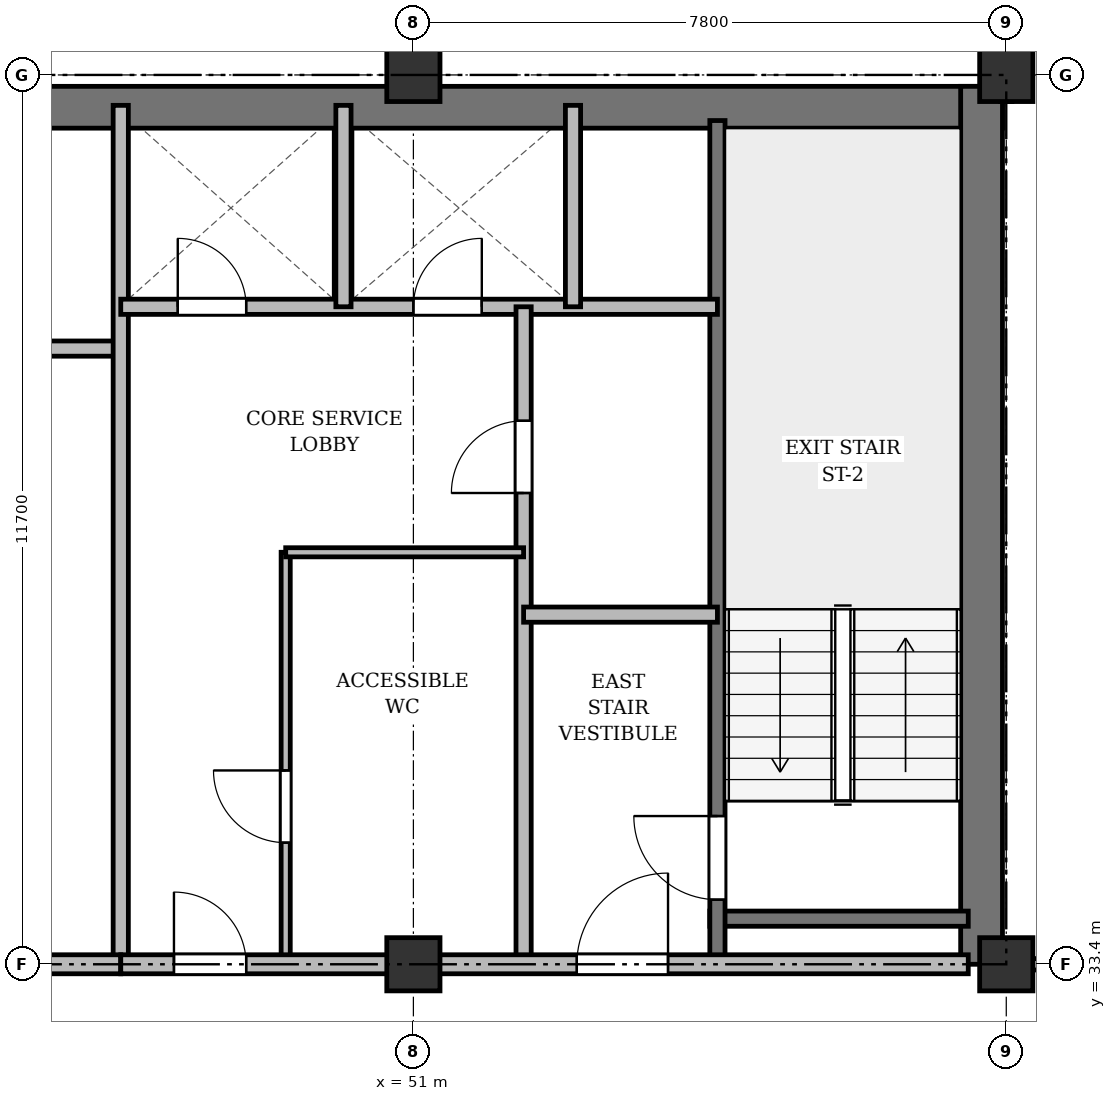
"""IFC4 building model, lengths in metres.
Left out: names, types, materials, properties, quantities, classifications, styles, units other than length and angle.
Written with IfcOpenShell. Run it as: python <this file> out.ifc"""

import sys

from ifc_helpers import new_model, si_unit, direction, frame, frame_2d, origin, origin_2d, place, context, subcontext, project, spatial, rectangle, extrude, source, transform, mapped, element, fill, save


model = new_model("IFC4")
c1 = context("Model", 3, precision=1e-05, world=origin(), true_north=direction((0.0, 1.0)))
c2 = subcontext(c1, "Body", "Model", "MODEL_VIEW")
j1 = project(units=[si_unit("LENGTHUNIT", "METRE"), si_unit("PLANEANGLEUNIT", "RADIAN")], contexts=[c1])
p1 = place(None, origin())
s1 = spatial("IfcSite", under=j1, at=p1, CompositionType="ELEMENT")
p2 = place(p1, origin())
s2 = spatial("IfcBuilding", under=s1, at=p2, CompositionType="ELEMENT")
p3 = place(p2, frame((0.0, 0.0, 178.9)))
s3 = spatial("IfcBuildingStorey", under=s2, at=p3, CompositionType="ELEMENT", Elevation=178.9)
m1 = source(origin(), c2, "Body", "SweptSolid", [
    extrude(rectangle(XDim=0.7, YDim=0.7, at=origin_2d()), origin(), (0.0, 0.0, 1.0), 3.6),
])
for number, where, z_axis, x_axis in (
    (1, (51.0, 33.4, 0.0), (0.0, 0.0, 1.0), (1.0, 0.0, 0.0)),
    (2, (51.0, 45.1, 0.0), (0.0, 0.0, 1.0), (1.0, 0.0, 0.0)),
    (3, (58.8, 33.4, 0.0), (0.0, 0.0, 1.0), (1.0, 0.0, 0.0)),
    (4, (58.8, 45.1, 0.0), (0.0, 0.0, 1.0), (1.0, 0.0, 0.0)),
):
    element("IfcColumn", number, at=place(p3, frame(where, z_axis=z_axis, x_axis=x_axis)), inside=s3, PredefinedType="COLUMN", context=c2, shape_type="MappedRepresentation", body=[
        mapped(m1, transform((0.0, 0.0, 0.0), x_axis=(1.0, 0.0, 0.0), y_axis=(0.0, 1.0, 0.0), z_axis=(0.0, 0.0, 1.0), scale=1.0)),
    ])
p4 = place(p3, frame((15.65, 44.675, 0.0), z_axis=(0.0, 0.0, 1.0), x_axis=(1.0, 0.0, 0.0)))
e5 = element("IfcWall", 5, at=p4, inside=s3, PredefinedType="SHEAR", context=c2, shape_type="SweptSolid", body=[
    extrude(rectangle(XDim=43.1, YDim=0.55, at=frame_2d((21.55, 0.0))), origin(), (0.0, 0.0, 1.0), 3.22),
])
p5 = place(p3, frame((58.475, 33.4, 0.0), z_axis=(0.0, 0.0, 1.0), x_axis=(0.0, 1.0, 0.0)))
e6 = element("IfcWall", 6, at=p5, inside=s3, PredefinedType="SHEAR", context=c2, shape_type="SweptSolid", body=[
    extrude(rectangle(XDim=11.55, YDim=0.55, at=frame_2d((5.775, 0.0))), origin(), (0.0, 0.0, 1.0), 3.22),
])
p6 = place(p3, frame((54.9, 34.0, 0.0), z_axis=(0.0, 0.0, 1.0), x_axis=(1.0, 0.0, 0.0)))
e7 = element("IfcWall", 7, at=p6, inside=s3, PredefinedType="SHEAR", context=c2, shape_type="SweptSolid", body=[
    extrude(rectangle(XDim=3.4, YDim=0.2, at=frame_2d((1.7, 0.0))), origin(), (0.0, 0.0, 1.0), 3.22),
])
p7 = place(p3, frame((55.0, 33.4, 0.0), z_axis=(0.0, 0.0, 1.0), x_axis=(0.0, 1.0, 0.0)))
e8 = element("IfcWall", 8, at=p7, inside=s3, PredefinedType="SHEAR", context=c2, shape_type="SweptSolid", body=[
    extrude(rectangle(XDim=11.1, YDim=0.2, at=frame_2d((5.55, 0.0))), origin(), (0.0, 0.0, 1.0), 3.22),
])
p8 = place(p7, frame((0.85, 0.0, 0.0)))
e9 = element("IfcOpeningElement", 9, at=p8, cuts=e8, PredefinedType="OPENING", context=c2, shape_type="SweptSolid", body=[
    extrude(rectangle(XDim=1.1, YDim=2.15, at=frame_2d((0.55, 1.075))), frame((0.0, 0.11, 0.0), z_axis=(0.0, -1.0, 0.0), x_axis=(1.0, 0.0, 0.0)), (0.0, 0.0, 1.0), 0.22),
])
p9 = place(p3, frame((40.25, 41.5, 0.0), z_axis=(0.0, 0.0, 1.0), x_axis=(1.0, 0.0, 0.0)))
e10 = element("IfcWall", 10, at=p9, inside=s3, PredefinedType="SOLIDWALL", context=c2, shape_type="SweptSolid", body=[
    extrude(rectangle(XDim=6.9, YDim=0.2, at=frame_2d((3.45, 0.0))), origin(), (0.0, 0.0, 1.0), 2.72),
])
p10 = place(p3, frame((47.15, 33.4, 0.0), z_axis=(0.0, 0.0, 1.0), x_axis=(0.0, 1.0, 0.0)))
e11 = element("IfcWall", 11, at=p10, inside=s3, PredefinedType="SOLIDWALL", context=c2, shape_type="SweptSolid", body=[
    extrude(rectangle(XDim=11.3, YDim=0.2, at=frame_2d((5.65, 0.0))), origin(), (0.0, 0.0, 1.0), 2.62),
])
p11 = place(p3, frame((33.3, 33.4, 0.0), z_axis=(0.0, 0.0, 1.0), x_axis=(1.0, 0.0, 0.0)))
e12 = element("IfcWall", 12, at=p11, inside=s3, PredefinedType="PARTITIONING", context=c2, shape_type="SweptSolid", body=[
    extrude(rectangle(XDim=13.85, YDim=0.25, at=frame_2d((6.925, 0.0))), origin(), (0.0, 0.0, 1.0), 2.62),
])
p12 = place(p11, frame((4.2, 0.0, 0.0)))
e13 = element("IfcOpeningElement", 13, at=p12, cuts=e12, PredefinedType="OPENING", context=c2, shape_type="SweptSolid", body=[
    extrude(rectangle(XDim=1.6, YDim=2.2, at=frame_2d((0.8, 1.1))), frame((0.0, 0.135, 0.0), z_axis=(0.0, -1.0, 0.0), x_axis=(1.0, 0.0, 0.0)), (0.0, 0.0, 1.0), 0.27),
])
p13 = place(p3, frame((47.15, 42.05, 0.0), z_axis=(0.0, 0.0, 1.0), x_axis=(1.0, 0.0, 0.0)))
e14 = element("IfcWall", 14, at=p13, inside=s3, PredefinedType="SOLIDWALL", context=c2, shape_type="SweptSolid", body=[
    extrude(rectangle(XDim=7.85, YDim=0.2, at=frame_2d((3.925, 0.0))), origin(), (0.0, 0.0, 1.0), 2.72),
])
p14 = place(p13, frame((0.75, 0.0, 0.0)))
e15 = element("IfcOpeningElement", 15, at=p14, cuts=e14, PredefinedType="OPENING", context=c2, shape_type="SweptSolid", body=[
    extrude(rectangle(XDim=0.9, YDim=2.1, at=frame_2d((0.45, 1.05))), frame((0.0, 0.11, 0.0), z_axis=(0.0, -1.0, 0.0), x_axis=(1.0, 0.0, 0.0)), (0.0, 0.0, 1.0), 0.22),
])
p15 = place(p13, frame((3.85, 0.0, 0.0)))
e16 = element("IfcOpeningElement", 16, at=p15, cuts=e14, PredefinedType="OPENING", context=c2, shape_type="SweptSolid", body=[
    extrude(rectangle(XDim=0.9, YDim=2.1, at=frame_2d((0.45, 1.05))), frame((0.0, 0.11, 0.0), z_axis=(0.0, -1.0, 0.0), x_axis=(1.0, 0.0, 0.0)), (0.0, 0.0, 1.0), 0.22),
])
for number, where, z_axis, x_axis in (
    (17, (50.08, 42.05, 0.0), (0.0, 0.0, 1.0), (0.0, 1.0, 0.0)),
    (18, (53.1, 42.05, 0.0), (0.0, 0.0, 1.0), (0.0, 1.0, 0.0)),
):
    element("IfcWall", number, at=place(p3, frame(where, z_axis=z_axis, x_axis=x_axis)), inside=s3, PredefinedType="SOLIDWALL", context=c2, shape_type="SweptSolid", body=[
        extrude(rectangle(XDim=2.65, YDim=0.2, at=frame_2d((1.325, 0.0))), origin(), (0.0, 0.0, 1.0), 3.22),
    ])
p16 = place(p3, frame((52.45, 33.4, 0.0), z_axis=(0.0, 0.0, 1.0), x_axis=(0.0, 1.0, 0.0)))
e19 = element("IfcWall", 19, at=p16, inside=s3, PredefinedType="PARTITIONING", context=c2, shape_type="SweptSolid", body=[
    extrude(rectangle(XDim=8.65, YDim=0.2, at=frame_2d((4.325, 0.0))), origin(), (0.0, 0.0, 1.0), 2.62),
])
p17 = place(p16, frame((6.2, 0.0, 0.0)))
e20 = element("IfcOpeningElement", 20, at=p17, cuts=e19, PredefinedType="OPENING", context=c2, shape_type="SweptSolid", body=[
    extrude(rectangle(XDim=0.95, YDim=2.15, at=frame_2d((0.475, 1.075))), frame((0.0, 0.11, 0.0), z_axis=(0.0, -1.0, 0.0), x_axis=(1.0, 0.0, 0.0)), (0.0, 0.0, 1.0), 0.22),
])
p18 = place(p3, frame((52.45, 38.0, 0.0), z_axis=(0.0, 0.0, 1.0), x_axis=(1.0, 0.0, 0.0)))
e21 = element("IfcWall", 21, at=p18, inside=s3, PredefinedType="PARTITIONING", context=c2, shape_type="SweptSolid", body=[
    extrude(rectangle(XDim=2.55, YDim=0.2, at=frame_2d((1.275, 0.0))), origin(), (0.0, 0.0, 1.0), 3.22),
])
p19 = place(p3, frame((49.32, 33.4, 0.0), z_axis=(0.0, 0.0, 1.0), x_axis=(0.0, 1.0, 0.0)))
e22 = element("IfcWall", 22, at=p19, inside=s3, PredefinedType="PARTITIONING", context=c2, shape_type="SweptSolid", body=[
    extrude(rectangle(XDim=5.42, YDim=0.12, at=frame_2d((2.71, 0.0))), origin(), (0.0, 0.0, 1.0), 2.62),
])
p20 = place(p19, frame((1.6, 0.0, 0.0)))
e23 = element("IfcOpeningElement", 23, at=p20, cuts=e22, PredefinedType="OPENING", context=c2, shape_type="SweptSolid", body=[
    extrude(rectangle(XDim=0.95, YDim=2.15, at=frame_2d((0.475, 1.075))), frame((0.0, 0.07, 0.0), z_axis=(0.0, -1.0, 0.0), x_axis=(1.0, 0.0, 0.0)), (0.0, 0.0, 1.0), 0.14),
])
p21 = place(p3, frame((49.32, 38.82, 0.0), z_axis=(0.0, 0.0, 1.0), x_axis=(1.0, 0.0, 0.0)))
e24 = element("IfcWall", 24, at=p21, inside=s3, PredefinedType="PARTITIONING", context=c2, shape_type="SweptSolid", body=[
    extrude(rectangle(XDim=3.13, YDim=0.12, at=frame_2d((1.565, 0.0))), origin(), (0.0, 0.0, 1.0), 2.72),
])
p22 = place(p3, frame((47.15, 33.4, 0.0), z_axis=(0.0, 0.0, 1.0), x_axis=(1.0, 0.0, 0.0)))
e25 = element("IfcWall", 25, at=p22, inside=s3, PredefinedType="PARTITIONING", context=c2, shape_type="SweptSolid", body=[
    extrude(rectangle(XDim=11.15, YDim=0.25, at=frame_2d((5.575, 0.0))), origin(), (0.0, 0.0, 1.0), 2.62),
])
p23 = place(p22, frame((0.7, 0.0, 0.0)))
e26 = element("IfcOpeningElement", 26, at=p23, cuts=e25, PredefinedType="OPENING", context=c2, shape_type="SweptSolid", body=[
    extrude(rectangle(XDim=0.95, YDim=2.15, at=frame_2d((0.475, 1.075))), frame((0.0, 0.135, 0.0), z_axis=(0.0, -1.0, 0.0), x_axis=(1.0, 0.0, 0.0)), (0.0, 0.0, 1.0), 0.27),
])
p24 = place(p22, frame((6.0, 0.0, 0.0)))
e27 = element("IfcOpeningElement", 27, at=p24, cuts=e25, PredefinedType="OPENING", context=c2, shape_type="SweptSolid", body=[
    extrude(rectangle(XDim=1.2, YDim=2.15, at=frame_2d((0.6, 1.075))), frame((0.0, 0.135, 0.0), z_axis=(0.0, -1.0, 0.0), x_axis=(1.0, 0.0, 0.0)), (0.0, 0.0, 1.0), 0.27),
])
p25 = place(p3, frame((58.8, 33.4, 0.0), z_axis=(0.0, 0.0, 1.0), x_axis=(1.0, 0.0, 0.0)))
e28 = element("IfcWall", 28, at=p25, inside=s3, PredefinedType="PARTITIONING", context=c2, shape_type="SweptSolid", body=[
    extrude(rectangle(XDim=7.55, YDim=0.15, at=frame_2d((3.775, 0.0))), origin(), (0.0, 0.0, 1.0), 2.62),
])
p26 = place(p25, frame((3.2, 0.0, 0.0)))
e29 = element("IfcOpeningElement", 29, at=p26, cuts=e28, PredefinedType="OPENING", context=c2, shape_type="SweptSolid", body=[
    extrude(rectangle(XDim=0.95, YDim=2.15, at=frame_2d((0.475, 1.075))), frame((0.0, 0.085, 0.0), z_axis=(0.0, -1.0, 0.0), x_axis=(1.0, 0.0, 0.0)), (0.0, 0.0, 1.0), 0.17),
])
p27 = place(p3, frame((58.8, 44.75, 0.0), z_axis=(0.0, 0.0, 1.0), x_axis=(0.0, 1.0, 0.0)))
e30 = element("IfcWall", 30, at=p27, inside=s3, PredefinedType="PARTITIONING", context=c2, shape_type="SweptSolid", body=[
    extrude(rectangle(XDim=3.61, YDim=0.15, at=frame_2d((1.805, 0.0))), origin(), (0.0, 0.0, 1.0), 2.72),
])
p28 = place(p27, frame((1.1, 0.0, 0.0)))
e31 = element("IfcOpeningElement", 31, at=p28, cuts=e30, PredefinedType="OPENING", context=c2, shape_type="SweptSolid", body=[
    extrude(rectangle(XDim=0.95, YDim=2.15, at=frame_2d((0.475, 1.075))), frame((0.0, 0.085, 0.0), z_axis=(0.0, -1.0, 0.0), x_axis=(1.0, 0.0, 0.0)), (0.0, 0.0, 1.0), 0.17),
])
m2 = source(origin(), c2, "Body", "SweptSolid", [
    extrude(rectangle(XDim=1.1, YDim=2.15, at=frame_2d((0.55, 1.075))), frame((0.0, 0.025, 0.0), z_axis=(0.0, -1.0, 0.0), x_axis=(1.0, 0.0, 0.0)), (0.0, 0.0, 1.0), 0.05),
])
p29 = place(p8, origin())
e32 = element("IfcDoor", 32, at=p29, inside=s3, OperationType="SINGLE_SWING_RIGHT", PredefinedType="DOOR", context=c2, shape_type="MappedRepresentation", body=[
    mapped(m2, transform((0.0, 0.0, 0.0), x_axis=(1.0, 0.0, 0.0), y_axis=(0.0, 1.0, 0.0), z_axis=(0.0, 0.0, 1.0), scale=1.0)),
])
fill(e9, e32)
m3 = source(origin(), c2, "Body", "SweptSolid", [
    extrude(rectangle(XDim=0.9, YDim=2.1, at=frame_2d((0.45, 1.05))), frame((0.0, 0.025, 0.0), z_axis=(0.0, -1.0, 0.0), x_axis=(1.0, 0.0, 0.0)), (0.0, 0.0, 1.0), 0.05),
])
p30 = place(p14, origin())
e33 = element("IfcDoor", 33, at=p30, inside=s3, OperationType="SINGLE_SWING_LEFT", PredefinedType="DOOR", context=c2, shape_type="MappedRepresentation", body=[
    mapped(m3, transform((0.0, 0.0, 0.0), x_axis=(1.0, 0.0, 0.0), y_axis=(0.0, 1.0, 0.0), z_axis=(0.0, 0.0, 1.0), scale=1.0)),
])
fill(e15, e33)
p31 = place(p15, origin())
e34 = element("IfcDoor", 34, at=p31, inside=s3, OperationType="SINGLE_SWING_RIGHT", PredefinedType="DOOR", context=c2, shape_type="MappedRepresentation", body=[
    mapped(m3, transform((0.0, 0.0, 0.0), x_axis=(1.0, 0.0, 0.0), y_axis=(0.0, 1.0, 0.0), z_axis=(0.0, 0.0, 1.0), scale=1.0)),
])
fill(e16, e34)
m4 = source(origin(), c2, "Body", "SweptSolid", [
    extrude(rectangle(XDim=0.95, YDim=2.15, at=frame_2d((0.475, 1.075))), frame((0.0, 0.025, 0.0), z_axis=(0.0, -1.0, 0.0), x_axis=(1.0, 0.0, 0.0)), (0.0, 0.0, 1.0), 0.05),
])
p32 = place(p17, origin())
e35 = element("IfcDoor", 35, at=p32, inside=s3, OperationType="SINGLE_SWING_LEFT", PredefinedType="DOOR", context=c2, shape_type="MappedRepresentation", body=[
    mapped(m4, transform((0.0, 0.0, 0.0), x_axis=(1.0, 0.0, 0.0), y_axis=(0.0, 1.0, 0.0), z_axis=(0.0, 0.0, 1.0), scale=1.0)),
])
fill(e20, e35)
p33 = place(p20, origin())
e36 = element("IfcDoor", 36, at=p33, inside=s3, OperationType="SINGLE_SWING_RIGHT", PredefinedType="DOOR", context=c2, shape_type="MappedRepresentation", body=[
    mapped(m4, transform((0.0, 0.0, 0.0), x_axis=(1.0, 0.0, 0.0), y_axis=(0.0, 1.0, 0.0), z_axis=(0.0, 0.0, 1.0), scale=1.0)),
])
fill(e23, e36)
p34 = place(p23, origin())
e37 = element("IfcDoor", 37, at=p34, inside=s3, OperationType="SINGLE_SWING_LEFT", PredefinedType="DOOR", context=c2, shape_type="MappedRepresentation", body=[
    mapped(m4, transform((0.0, 0.0, 0.0), x_axis=(1.0, 0.0, 0.0), y_axis=(0.0, 1.0, 0.0), z_axis=(0.0, 0.0, 1.0), scale=1.0)),
])
fill(e26, e37)
m5 = source(origin(), c2, "Body", "SweptSolid", [
    extrude(rectangle(XDim=1.2, YDim=2.15, at=frame_2d((0.6, 1.075))), frame((0.0, 0.025, 0.0), z_axis=(0.0, -1.0, 0.0), x_axis=(1.0, 0.0, 0.0)), (0.0, 0.0, 1.0), 0.05),
])
p35 = place(p24, origin())
e38 = element("IfcDoor", 38, at=p35, inside=s3, OperationType="SINGLE_SWING_RIGHT", PredefinedType="DOOR", context=c2, shape_type="MappedRepresentation", body=[
    mapped(m5, transform((0.0, 0.0, 0.0), x_axis=(1.0, 0.0, 0.0), y_axis=(0.0, 1.0, 0.0), z_axis=(0.0, 0.0, 1.0), scale=1.0)),
])
fill(e27, e38)
save(model, sys.argv[1])
